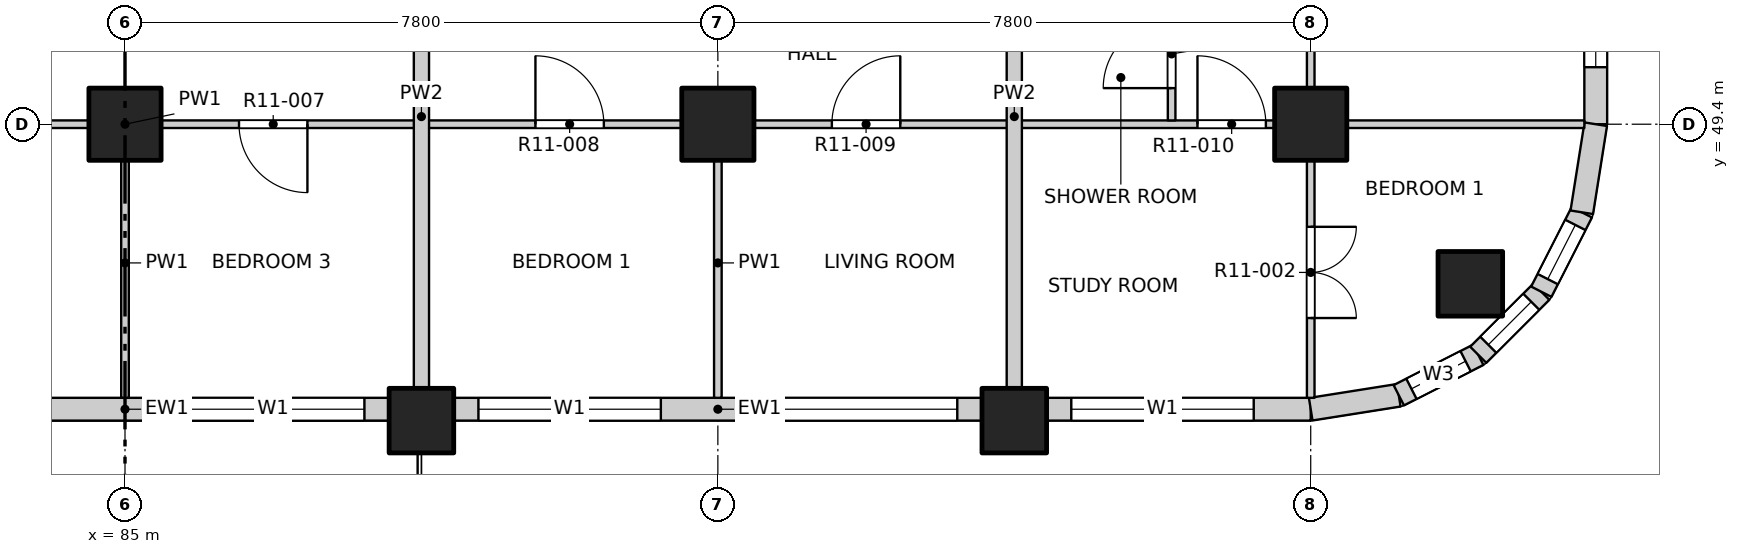
"""IFC4 building model, lengths in metres.
Left out: names, types, materials, properties, quantities, classifications, styles, units other than length and angle.
Written with IfcOpenShell. Run it as: python <this file> out.ifc"""

import sys

from ifc_helpers import new_model, si_unit, direction, frame, frame_2d, origin, origin_2d, place, context, subcontext, project, spatial, rectangle, extrude, element, fill, save


model = new_model("IFC4")
c1 = context("Model", 3, precision=1e-05, world=origin(), true_north=direction((0.0, 1.0)))
c2 = subcontext(c1, "Body", "Model", "MODEL_VIEW")
j1 = project(units=[si_unit("LENGTHUNIT", "METRE"), si_unit("PLANEANGLEUNIT", "RADIAN")], contexts=[c1])
p1 = place(None, origin())
s1 = spatial("IfcSite", under=j1, at=p1, CompositionType="ELEMENT")
p2 = place(p1, origin())
s2 = spatial("IfcBuilding", under=s1, at=p2, CompositionType="ELEMENT")
p3 = place(p2, frame((0.0, 0.0, 130.5)))
s3 = spatial("IfcBuildingStorey", under=s2, at=p3, CompositionType="ELEMENT", Elevation=130.5)
for number, where, z_axis, x_axis in (
    (1, (102.7, 47.3, -0.25), (0.0, 0.0, 1.0), (1.0, 0.0, 0.0)),
    (2, (88.9, 45.5, -0.25), (0.0, 0.0, 1.0), (1.0, 0.0, 0.0)),
    (3, (96.7, 45.5, -0.25), (0.0, 0.0, 1.0), (1.0, 0.0, 0.0)),
):
    element("IfcColumn", number, at=place(p3, frame(where, z_axis=z_axis, x_axis=x_axis)), inside=s3, PredefinedType="COLUMN", context=c2, shape_type="SweptSolid", body=[
        extrude(rectangle(XDim=0.85, YDim=0.85, at=origin_2d()), origin(), (0.0, 0.0, 1.0), 3.4),
    ])
for number, where, z_axis, x_axis in (
    (4, (85.0, 49.4, -0.25), (0.0, 0.0, 1.0), (1.0, 0.0, 0.0)),
    (5, (92.8, 49.4, -0.25), (0.0, 0.0, 1.0), (1.0, 0.0, 0.0)),
    (6, (100.6, 49.4, -0.25), (0.0, 0.0, 1.0), (1.0, 0.0, 0.0)),
):
    element("IfcColumn", number, at=place(p3, frame(where, z_axis=z_axis, x_axis=x_axis)), inside=s3, PredefinedType="COLUMN", context=c2, shape_type="SweptSolid", body=[
        extrude(rectangle(XDim=0.95, YDim=0.95, at=origin_2d()), origin(), (0.0, 0.0, 1.0), 3.4),
    ])
p4 = place(p3, frame((81.525, 45.65, 0.0), z_axis=(0.0, 0.0, 1.0), x_axis=(1.0, 0.0, 0.0)))
e7 = element("IfcWall", 7, at=p4, inside=s3, PredefinedType="SOLIDWALL", context=c2, shape_type="SweptSolid", body=[
    extrude(rectangle(XDim=6.95, YDim=0.3, at=frame_2d((3.475, 0.0))), origin(), (0.0, 0.0, 1.0), 2.7),
])
p5 = place(p4, frame((0.625, 0.0, 0.0)))
e8 = element("IfcOpeningElement", 8, at=p5, cuts=e7, PredefinedType="OPENING", context=c2, shape_type="SweptSolid", body=[
    extrude(rectangle(XDim=1.8, YDim=2.4, at=frame_2d((0.9, 1.2))), frame((0.0, 0.16, 0.0), z_axis=(0.0, -1.0, 0.0), x_axis=(1.0, 0.0, 0.0)), (0.0, 0.0, 1.0), 0.32),
])
p6 = place(p4, frame((4.225, 0.0, 0.9)))
e9 = element("IfcOpeningElement", 9, at=p6, cuts=e7, PredefinedType="OPENING", context=c2, shape_type="SweptSolid", body=[
    extrude(rectangle(XDim=2.4, YDim=1.8, at=frame_2d((1.2, 0.9))), frame((0.0, 0.16, 0.0), z_axis=(0.0, -1.0, 0.0), x_axis=(1.0, 0.0, 0.0)), (0.0, 0.0, 1.0), 0.32),
])
p7 = place(p3, frame((89.325, 45.65, 0.0), z_axis=(0.0, 0.0, 1.0), x_axis=(1.0, 0.0, 0.0)))
e10 = element("IfcWall", 10, at=p7, inside=s3, PredefinedType="SOLIDWALL", context=c2, shape_type="SweptSolid", body=[
    extrude(rectangle(XDim=6.95, YDim=0.3, at=frame_2d((3.475, 0.0))), origin(), (0.0, 0.0, 1.0), 2.7),
])
p8 = place(p7, frame((0.325, 0.0, 0.9)))
e11 = element("IfcOpeningElement", 11, at=p8, cuts=e10, PredefinedType="OPENING", context=c2, shape_type="SweptSolid", body=[
    extrude(rectangle(XDim=2.4, YDim=1.8, at=frame_2d((1.2, 0.9))), frame((0.0, 0.16, 0.0), z_axis=(0.0, -1.0, 0.0), x_axis=(1.0, 0.0, 0.0)), (0.0, 0.0, 1.0), 0.32),
])
p9 = place(p7, frame((4.225, 0.0, 0.9)))
e12 = element("IfcOpeningElement", 12, at=p9, cuts=e10, PredefinedType="OPENING", context=c2, shape_type="SweptSolid", body=[
    extrude(rectangle(XDim=2.4, YDim=1.8, at=frame_2d((1.2, 0.9))), frame((0.0, 0.16, 0.0), z_axis=(0.0, -1.0, 0.0), x_axis=(1.0, 0.0, 0.0)), (0.0, 0.0, 1.0), 0.32),
])
p10 = place(p3, frame((97.125, 45.65, 0.0), z_axis=(0.0, 0.0, 1.0), x_axis=(1.0, 0.0, 0.0)))
e13 = element("IfcWall", 13, at=p10, inside=s3, PredefinedType="SOLIDWALL", context=c2, shape_type="SweptSolid", body=[
    extrude(rectangle(XDim=3.475, YDim=0.3, at=frame_2d((1.738, 0.0))), origin(), (0.0, 0.0, 1.0), 2.7),
])
p11 = place(p10, frame((0.325, 0.0, 0.9)))
e14 = element("IfcOpeningElement", 14, at=p11, cuts=e13, PredefinedType="OPENING", context=c2, shape_type="SweptSolid", body=[
    extrude(rectangle(XDim=2.4, YDim=1.8, at=frame_2d((1.2, 0.9))), frame((0.0, 0.16, 0.0), z_axis=(0.0, -1.0, 0.0), x_axis=(1.0, 0.0, 0.0)), (0.0, 0.0, 1.0), 0.32),
])
p12 = place(p3, frame((104.35, 49.4, 0.0), z_axis=(0.0, 0.0, 1.0), x_axis=(0.0, 1.0, 0.0)))
e15 = element("IfcWall", 15, at=p12, inside=s3, PredefinedType="SOLIDWALL", context=c2, shape_type="SweptSolid", body=[
    extrude(rectangle(XDim=3.475, YDim=0.3, at=frame_2d((1.738, 0.0))), origin(), (0.0, 0.0, 1.0), 2.7),
])
p13 = place(p12, frame((0.75, 0.0, 0.9)))
e16 = element("IfcOpeningElement", 16, at=p13, cuts=e15, PredefinedType="OPENING", context=c2, shape_type="SweptSolid", body=[
    extrude(rectangle(XDim=2.4, YDim=1.8, at=frame_2d((1.2, 0.9))), frame((0.0, 0.16, 0.0), z_axis=(0.0, -1.0, 0.0), x_axis=(1.0, 0.0, 0.0)), (0.0, 0.0, 1.0), 0.32),
])
p14 = place(p3, frame((100.6, 45.65, 0.0), z_axis=(0.0, 0.0, 1.0), x_axis=(0.987678452879, 0.156496880861, 0.0)))
e17 = element("IfcWall", 17, at=p14, inside=s3, PredefinedType="SOLIDWALL", context=c2, shape_type="SweptSolid", body=[
    extrude(rectangle(XDim=1.173, YDim=0.3, at=frame_2d((0.586, 0.0))), origin(), (0.0, 0.0, 1.0), 2.7),
])
p15 = place(p3, frame((101.759, 45.833, 0.0), z_axis=(0.0, 0.0, 1.0), x_axis=(0.890988677504, 0.454025524128, 0.0)))
e18 = element("IfcWall", 18, at=p15, inside=s3, PredefinedType="SOLIDWALL", context=c2, shape_type="SweptSolid", body=[
    extrude(rectangle(XDim=1.173, YDim=0.3, at=frame_2d((0.587, 0.0))), origin(), (0.0, 0.0, 1.0), 2.7),
])
p16 = place(p15, frame((0.187, 0.0, 0.9)))
e19 = element("IfcOpeningElement", 19, at=p16, cuts=e18, PredefinedType="OPENING", context=c2, shape_type="SweptSolid", body=[
    extrude(rectangle(XDim=0.8, YDim=1.2, at=frame_2d((0.4, 0.6))), frame((0.0, 0.16, 0.0), z_axis=(0.0, -1.0, 0.0), x_axis=(1.0, 0.0, 0.0)), (0.0, 0.0, 1.0), 0.32),
])
p17 = place(p3, frame((102.804, 46.366, 0.0), z_axis=(0.0, 0.0, 1.0), x_axis=(0.707106781187, 0.707106781187, 0.0)))
e20 = element("IfcWall", 20, at=p17, inside=s3, PredefinedType="SOLIDWALL", context=c2, shape_type="SweptSolid", body=[
    extrude(rectangle(XDim=1.173, YDim=0.3, at=frame_2d((0.586, 0.0))), origin(), (0.0, 0.0, 1.0), 2.7),
])
p18 = place(p17, frame((0.187, 0.0, 0.9)))
e21 = element("IfcOpeningElement", 21, at=p18, cuts=e20, PredefinedType="OPENING", context=c2, shape_type="SweptSolid", body=[
    extrude(rectangle(XDim=0.8, YDim=1.2, at=frame_2d((0.4, 0.6))), frame((0.0, 0.16, 0.0), z_axis=(0.0, -1.0, 0.0), x_axis=(1.0, 0.0, 0.0)), (0.0, 0.0, 1.0), 0.32),
])
p19 = place(p3, frame((103.634, 47.196, 0.0), z_axis=(0.0, 0.0, 1.0), x_axis=(0.454025524128, 0.890988677504, 0.0)))
e22 = element("IfcWall", 22, at=p19, inside=s3, PredefinedType="SOLIDWALL", context=c2, shape_type="SweptSolid", body=[
    extrude(rectangle(XDim=1.173, YDim=0.3, at=frame_2d((0.587, 0.0))), origin(), (0.0, 0.0, 1.0), 2.7),
])
p20 = place(p19, frame((0.187, 0.0, 0.9)))
e23 = element("IfcOpeningElement", 23, at=p20, cuts=e22, PredefinedType="OPENING", context=c2, shape_type="SweptSolid", body=[
    extrude(rectangle(XDim=0.8, YDim=1.2, at=frame_2d((0.4, 0.6))), frame((0.0, 0.16, 0.0), z_axis=(0.0, -1.0, 0.0), x_axis=(1.0, 0.0, 0.0)), (0.0, 0.0, 1.0), 0.32),
])
p21 = place(p3, frame((104.167, 48.241, 0.0), z_axis=(0.0, 0.0, 1.0), x_axis=(0.156496880861, 0.987678452879, 0.0)))
e24 = element("IfcWall", 24, at=p21, inside=s3, PredefinedType="SOLIDWALL", context=c2, shape_type="SweptSolid", body=[
    extrude(rectangle(XDim=1.173, YDim=0.3, at=frame_2d((0.586, 0.0))), origin(), (0.0, 0.0, 1.0), 2.7),
])
p22 = place(p3, frame((65.8, 49.4, 0.0), z_axis=(0.0, 0.0, 1.0), x_axis=(1.0, 0.0, 0.0)))
e25 = element("IfcWall", 25, at=p22, inside=s3, PredefinedType="PARTITIONING", context=c2, shape_type="SweptSolid", body=[
    extrude(rectangle(XDim=38.4, YDim=0.1, at=frame_2d((19.2, 0.0))), origin(), (0.0, 0.0, 1.0), 3.15),
])
p23 = place(p22, frame((4.19, 0.0, 0.0)))
e26 = element("IfcOpeningElement", 26, at=p23, cuts=e25, PredefinedType="OPENING", context=c2, shape_type="SweptSolid", body=[
    extrude(rectangle(XDim=0.9, YDim=2.1, at=frame_2d((0.45, 1.05))), frame((0.0, 0.06, 0.0), z_axis=(0.0, -1.0, 0.0), x_axis=(1.0, 0.0, 0.0)), (0.0, 0.0, 1.0), 0.12),
])
p24 = place(p22, frame((9.0, 0.0, 0.0)))
e27 = element("IfcOpeningElement", 27, at=p24, cuts=e25, PredefinedType="OPENING", context=c2, shape_type="SweptSolid", body=[
    extrude(rectangle(XDim=0.9, YDim=2.1, at=frame_2d((0.45, 1.05))), frame((0.0, 0.06, 0.0), z_axis=(0.0, -1.0, 0.0), x_axis=(1.0, 0.0, 0.0)), (0.0, 0.0, 1.0), 0.12),
])
p25 = place(p22, frame((12.9, 0.0, 0.0)))
e28 = element("IfcOpeningElement", 28, at=p25, cuts=e25, PredefinedType="OPENING", context=c2, shape_type="SweptSolid", body=[
    extrude(rectangle(XDim=0.9, YDim=2.1, at=frame_2d((0.45, 1.05))), frame((0.0, 0.06, 0.0), z_axis=(0.0, -1.0, 0.0), x_axis=(1.0, 0.0, 0.0)), (0.0, 0.0, 1.0), 0.12),
])
p26 = place(p22, frame((16.8, 0.0, 0.0)))
e29 = element("IfcOpeningElement", 29, at=p26, cuts=e25, PredefinedType="OPENING", context=c2, shape_type="SweptSolid", body=[
    extrude(rectangle(XDim=0.9, YDim=2.1, at=frame_2d((0.45, 1.05))), frame((0.0, 0.06, 0.0), z_axis=(0.0, -1.0, 0.0), x_axis=(1.0, 0.0, 0.0)), (0.0, 0.0, 1.0), 0.12),
])
p27 = place(p22, frame((20.7, 0.0, 0.0)))
e30 = element("IfcOpeningElement", 30, at=p27, cuts=e25, PredefinedType="OPENING", context=c2, shape_type="SweptSolid", body=[
    extrude(rectangle(XDim=0.9, YDim=2.1, at=frame_2d((0.45, 1.05))), frame((0.0, 0.06, 0.0), z_axis=(0.0, -1.0, 0.0), x_axis=(1.0, 0.0, 0.0)), (0.0, 0.0, 1.0), 0.12),
])
p28 = place(p22, frame((24.6, 0.0, 0.0)))
e31 = element("IfcOpeningElement", 31, at=p28, cuts=e25, PredefinedType="OPENING", context=c2, shape_type="SweptSolid", body=[
    extrude(rectangle(XDim=0.9, YDim=2.1, at=frame_2d((0.45, 1.05))), frame((0.0, 0.06, 0.0), z_axis=(0.0, -1.0, 0.0), x_axis=(1.0, 0.0, 0.0)), (0.0, 0.0, 1.0), 0.12),
])
p29 = place(p22, frame((28.5, 0.0, 0.0)))
e32 = element("IfcOpeningElement", 32, at=p29, cuts=e25, PredefinedType="OPENING", context=c2, shape_type="SweptSolid", body=[
    extrude(rectangle(XDim=0.9, YDim=2.1, at=frame_2d((0.45, 1.05))), frame((0.0, 0.06, 0.0), z_axis=(0.0, -1.0, 0.0), x_axis=(1.0, 0.0, 0.0)), (0.0, 0.0, 1.0), 0.12),
])
p30 = place(p22, frame((33.31, 0.0, 0.0)))
e33 = element("IfcOpeningElement", 33, at=p30, cuts=e25, PredefinedType="OPENING", context=c2, shape_type="SweptSolid", body=[
    extrude(rectangle(XDim=0.9, YDim=2.1, at=frame_2d((0.45, 1.05))), frame((0.0, 0.06, 0.0), z_axis=(0.0, -1.0, 0.0), x_axis=(1.0, 0.0, 0.0)), (0.0, 0.0, 1.0), 0.12),
])
p31 = place(p3, frame((85.0, 45.8, 0.0), z_axis=(0.0, 0.0, 1.0), x_axis=(0.0, 1.0, 0.0)))
e34 = element("IfcWall", 34, at=p31, inside=s3, PredefinedType="PARTITIONING", context=c2, shape_type="SweptSolid", body=[
    extrude(rectangle(XDim=3.55, YDim=0.1, at=frame_2d((1.775, 0.0))), origin(), (0.0, 0.0, 1.0), 3.15),
])
p32 = place(p3, frame((88.9, 45.8, 0.0), z_axis=(0.0, 0.0, 1.0), x_axis=(0.0, 1.0, 0.0)))
e35 = element("IfcWall", 35, at=p32, inside=s3, PredefinedType="PARTITIONING", context=c2, shape_type="SweptSolid", body=[
    extrude(rectangle(XDim=7.4, YDim=0.2, at=frame_2d((3.7, 0.0))), origin(), (0.0, 0.0, 1.0), 2.55),
])
p33 = place(p3, frame((92.8, 45.8, 0.0), z_axis=(0.0, 0.0, 1.0), x_axis=(0.0, 1.0, 0.0)))
e36 = element("IfcWall", 36, at=p33, inside=s3, PredefinedType="PARTITIONING", context=c2, shape_type="SweptSolid", body=[
    extrude(rectangle(XDim=3.55, YDim=0.1, at=frame_2d((1.775, 0.0))), origin(), (0.0, 0.0, 1.0), 3.15),
])
p34 = place(p3, frame((96.7, 45.8, 0.0), z_axis=(0.0, 0.0, 1.0), x_axis=(0.0, 1.0, 0.0)))
e37 = element("IfcWall", 37, at=p34, inside=s3, PredefinedType="PARTITIONING", context=c2, shape_type="SweptSolid", body=[
    extrude(rectangle(XDim=7.4, YDim=0.2, at=frame_2d((3.7, 0.0))), origin(), (0.0, 0.0, 1.0), 3.15),
])
p35 = place(p3, frame((98.77, 49.45, 0.0), z_axis=(0.0, 0.0, 1.0), x_axis=(0.0, 1.0, 0.0)))
e38 = element("IfcWall", 38, at=p35, inside=s3, PredefinedType="PARTITIONING", context=c2, shape_type="SweptSolid", body=[
    extrude(rectangle(XDim=4.5, YDim=0.1, at=frame_2d((2.25, 0.0))), origin(), (0.0, 0.0, 1.0), 3.15),
])
p36 = place(p35, frame((0.425, 0.0, 0.0)))
e39 = element("IfcOpeningElement", 39, at=p36, cuts=e38, PredefinedType="OPENING", context=c2, shape_type="SweptSolid", body=[
    extrude(rectangle(XDim=0.9, YDim=2.1, at=frame_2d((0.45, 1.05))), frame((0.0, 0.06, 0.0), z_axis=(0.0, -1.0, 0.0), x_axis=(1.0, 0.0, 0.0)), (0.0, 0.0, 1.0), 0.12),
])
p37 = place(p35, frame((2.775, 0.0, 0.0)))
e40 = element("IfcOpeningElement", 40, at=p37, cuts=e38, PredefinedType="OPENING", context=c2, shape_type="SweptSolid", body=[
    extrude(rectangle(XDim=0.8, YDim=2.1, at=frame_2d((0.4, 1.05))), frame((0.0, 0.06, 0.0), z_axis=(0.0, -1.0, 0.0), x_axis=(1.0, 0.0, 0.0)), (0.0, 0.0, 1.0), 0.12),
])
p38 = place(p3, frame((100.6, 45.8, 0.0), z_axis=(0.0, 0.0, 1.0), x_axis=(0.0, 1.0, 0.0)))
e41 = element("IfcWall", 41, at=p38, inside=s3, PredefinedType="PARTITIONING", context=c2, shape_type="SweptSolid", body=[
    extrude(rectangle(XDim=38.4, YDim=0.1, at=frame_2d((19.2, 0.0))), origin(), (0.0, 0.0, 1.0), 3.15),
])
p39 = place(p38, frame((1.05, 0.0, 0.0)))
e42 = element("IfcOpeningElement", 42, at=p39, cuts=e41, PredefinedType="OPENING", context=c2, shape_type="SweptSolid", body=[
    extrude(rectangle(XDim=1.2, YDim=2.1, at=frame_2d((0.6, 1.05))), frame((0.0, 0.06, 0.0), z_axis=(0.0, -1.0, 0.0), x_axis=(1.0, 0.0, 0.0)), (0.0, 0.0, 1.0), 0.12),
])
p40 = place(p38, frame((5.1, 0.0, 0.0)))
e43 = element("IfcOpeningElement", 43, at=p40, cuts=e41, PredefinedType="OPENING", context=c2, shape_type="SweptSolid", body=[
    extrude(rectangle(XDim=0.9, YDim=2.1, at=frame_2d((0.45, 1.05))), frame((0.0, 0.06, 0.0), z_axis=(0.0, -1.0, 0.0), x_axis=(1.0, 0.0, 0.0)), (0.0, 0.0, 1.0), 0.12),
])
p41 = place(p38, frame((9.0, 0.0, 0.0)))
e44 = element("IfcOpeningElement", 44, at=p41, cuts=e41, PredefinedType="OPENING", context=c2, shape_type="SweptSolid", body=[
    extrude(rectangle(XDim=0.9, YDim=2.1, at=frame_2d((0.45, 1.05))), frame((0.0, 0.06, 0.0), z_axis=(0.0, -1.0, 0.0), x_axis=(1.0, 0.0, 0.0)), (0.0, 0.0, 1.0), 0.12),
])
p42 = place(p38, frame((12.9, 0.0, 0.0)))
e45 = element("IfcOpeningElement", 45, at=p42, cuts=e41, PredefinedType="OPENING", context=c2, shape_type="SweptSolid", body=[
    extrude(rectangle(XDim=0.9, YDim=2.1, at=frame_2d((0.45, 1.05))), frame((0.0, 0.06, 0.0), z_axis=(0.0, -1.0, 0.0), x_axis=(1.0, 0.0, 0.0)), (0.0, 0.0, 1.0), 0.12),
])
p43 = place(p38, frame((16.8, 0.0, 0.0)))
e46 = element("IfcOpeningElement", 46, at=p43, cuts=e41, PredefinedType="OPENING", context=c2, shape_type="SweptSolid", body=[
    extrude(rectangle(XDim=0.9, YDim=2.1, at=frame_2d((0.45, 1.05))), frame((0.0, 0.06, 0.0), z_axis=(0.0, -1.0, 0.0), x_axis=(1.0, 0.0, 0.0)), (0.0, 0.0, 1.0), 0.12),
])
p44 = place(p38, frame((20.7, 0.0, 0.0)))
e47 = element("IfcOpeningElement", 47, at=p44, cuts=e41, PredefinedType="OPENING", context=c2, shape_type="SweptSolid", body=[
    extrude(rectangle(XDim=0.9, YDim=2.1, at=frame_2d((0.45, 1.05))), frame((0.0, 0.06, 0.0), z_axis=(0.0, -1.0, 0.0), x_axis=(1.0, 0.0, 0.0)), (0.0, 0.0, 1.0), 0.12),
])
p45 = place(p38, frame((24.6, 0.0, 0.0)))
e48 = element("IfcOpeningElement", 48, at=p45, cuts=e41, PredefinedType="OPENING", context=c2, shape_type="SweptSolid", body=[
    extrude(rectangle(XDim=0.9, YDim=2.1, at=frame_2d((0.45, 1.05))), frame((0.0, 0.06, 0.0), z_axis=(0.0, -1.0, 0.0), x_axis=(1.0, 0.0, 0.0)), (0.0, 0.0, 1.0), 0.12),
])
p46 = place(p38, frame((30.3, 0.0, 0.0)))
e49 = element("IfcOpeningElement", 49, at=p46, cuts=e41, PredefinedType="OPENING", context=c2, shape_type="SweptSolid", body=[
    extrude(rectangle(XDim=1.2, YDim=2.1, at=frame_2d((0.6, 1.05))), frame((0.0, 0.06, 0.0), z_axis=(0.0, -1.0, 0.0), x_axis=(1.0, 0.0, 0.0)), (0.0, 0.0, 1.0), 0.12),
])
p47 = place(p38, frame((36.15, 0.0, 0.0)))
e50 = element("IfcOpeningElement", 50, at=p47, cuts=e41, PredefinedType="OPENING", context=c2, shape_type="SweptSolid", body=[
    extrude(rectangle(XDim=1.2, YDim=2.1, at=frame_2d((0.6, 1.05))), frame((0.0, 0.06, 0.0), z_axis=(0.0, -1.0, 0.0), x_axis=(1.0, 0.0, 0.0)), (0.0, 0.0, 1.0), 0.12),
])
p48 = place(p6, origin())
e51 = element("IfcWindow", 51, at=p48, inside=s3, PartitioningType="DOUBLE_PANEL_VERTICAL", PredefinedType="WINDOW", context=c2, shape_type="SweptSolid", body=[
    extrude(rectangle(XDim=2.4, YDim=1.8, at=frame_2d((1.2, 0.9))), frame((0.0, 0.03, 0.0), z_axis=(0.0, -1.0, 0.0), x_axis=(1.0, 0.0, 0.0)), (0.0, 0.0, 1.0), 0.06),
])
fill(e9, e51)
p49 = place(p8, origin())
e52 = element("IfcWindow", 52, at=p49, inside=s3, PartitioningType="DOUBLE_PANEL_VERTICAL", PredefinedType="WINDOW", context=c2, shape_type="SweptSolid", body=[
    extrude(rectangle(XDim=2.4, YDim=1.8, at=frame_2d((1.2, 0.9))), frame((0.0, 0.03, 0.0), z_axis=(0.0, -1.0, 0.0), x_axis=(1.0, 0.0, 0.0)), (0.0, 0.0, 1.0), 0.06),
])
fill(e11, e52)
p50 = place(p9, origin())
e53 = element("IfcWindow", 53, at=p50, inside=s3, PartitioningType="DOUBLE_PANEL_VERTICAL", PredefinedType="WINDOW", context=c2, shape_type="SweptSolid", body=[
    extrude(rectangle(XDim=2.4, YDim=1.8, at=frame_2d((1.2, 0.9))), frame((0.0, 0.03, 0.0), z_axis=(0.0, -1.0, 0.0), x_axis=(1.0, 0.0, 0.0)), (0.0, 0.0, 1.0), 0.06),
])
fill(e12, e53)
p51 = place(p11, origin())
e54 = element("IfcWindow", 54, at=p51, inside=s3, PartitioningType="DOUBLE_PANEL_VERTICAL", PredefinedType="WINDOW", context=c2, shape_type="SweptSolid", body=[
    extrude(rectangle(XDim=2.4, YDim=1.8, at=frame_2d((1.2, 0.9))), frame((0.0, 0.03, 0.0), z_axis=(0.0, -1.0, 0.0), x_axis=(1.0, 0.0, 0.0)), (0.0, 0.0, 1.0), 0.06),
])
fill(e14, e54)
p52 = place(p13, origin())
e55 = element("IfcWindow", 55, at=p52, inside=s3, PartitioningType="DOUBLE_PANEL_VERTICAL", PredefinedType="WINDOW", context=c2, shape_type="SweptSolid", body=[
    extrude(rectangle(XDim=2.4, YDim=1.8, at=frame_2d((1.2, 0.9))), frame((0.0, 0.03, 0.0), z_axis=(0.0, -1.0, 0.0), x_axis=(1.0, 0.0, 0.0)), (0.0, 0.0, 1.0), 0.06),
])
fill(e16, e55)
p53 = place(p16, origin())
e56 = element("IfcWindow", 56, at=p53, inside=s3, PartitioningType="SINGLE_PANEL", PredefinedType="WINDOW", context=c2, shape_type="SweptSolid", body=[
    extrude(rectangle(XDim=0.8, YDim=1.2, at=frame_2d((0.4, 0.6))), frame((0.0, 0.03, 0.0), z_axis=(0.0, -1.0, 0.0), x_axis=(1.0, 0.0, 0.0)), (0.0, 0.0, 1.0), 0.06),
])
fill(e19, e56)
p54 = place(p18, origin())
e57 = element("IfcWindow", 57, at=p54, inside=s3, PartitioningType="SINGLE_PANEL", PredefinedType="WINDOW", context=c2, shape_type="SweptSolid", body=[
    extrude(rectangle(XDim=0.8, YDim=1.2, at=frame_2d((0.4, 0.6))), frame((0.0, 0.03, 0.0), z_axis=(0.0, -1.0, 0.0), x_axis=(1.0, 0.0, 0.0)), (0.0, 0.0, 1.0), 0.06),
])
fill(e21, e57)
p55 = place(p20, origin())
e58 = element("IfcWindow", 58, at=p55, inside=s3, PartitioningType="SINGLE_PANEL", PredefinedType="WINDOW", context=c2, shape_type="SweptSolid", body=[
    extrude(rectangle(XDim=0.8, YDim=1.2, at=frame_2d((0.4, 0.6))), frame((0.0, 0.03, 0.0), z_axis=(0.0, -1.0, 0.0), x_axis=(1.0, 0.0, 0.0)), (0.0, 0.0, 1.0), 0.06),
])
fill(e23, e58)
p56 = place(p39, origin())
e59 = element("IfcDoor", 59, at=p56, inside=s3, OperationType="DOUBLE_DOOR_SINGLE_SWING", PredefinedType="DOOR", context=c2, shape_type="SweptSolid", body=[
    extrude(rectangle(XDim=1.2, YDim=2.1, at=frame_2d((0.6, 1.05))), frame((0.0, 0.025, 0.0), z_axis=(0.0, -1.0, 0.0), x_axis=(1.0, 0.0, 0.0)), (0.0, 0.0, 1.0), 0.05),
])
fill(e42, e59)
p57 = place(p27, origin())
e60 = element("IfcDoor", 60, at=p57, inside=s3, OperationType="SINGLE_SWING_LEFT", PredefinedType="DOOR", context=c2, shape_type="SweptSolid", body=[
    extrude(rectangle(XDim=0.9, YDim=2.1, at=frame_2d((0.45, 1.05))), frame((0.0, 0.025, 0.0), z_axis=(0.0, -1.0, 0.0), x_axis=(1.0, 0.0, 0.0)), (0.0, 0.0, 1.0), 0.05),
])
fill(e30, e60)
p58 = place(p28, origin())
e61 = element("IfcDoor", 61, at=p58, inside=s3, OperationType="SINGLE_SWING_LEFT", PredefinedType="DOOR", context=c2, shape_type="SweptSolid", body=[
    extrude(rectangle(XDim=0.9, YDim=2.1, at=frame_2d((0.45, 1.05))), frame((0.0, 0.025, 0.0), z_axis=(0.0, -1.0, 0.0), x_axis=(1.0, 0.0, 0.0)), (0.0, 0.0, 1.0), 0.05),
])
fill(e31, e61)
p59 = place(p29, origin())
e62 = element("IfcDoor", 62, at=p59, inside=s3, OperationType="SINGLE_SWING_RIGHT", PredefinedType="DOOR", context=c2, shape_type="SweptSolid", body=[
    extrude(rectangle(XDim=0.9, YDim=2.1, at=frame_2d((0.45, 1.05))), frame((0.0, 0.025, 0.0), z_axis=(0.0, -1.0, 0.0), x_axis=(1.0, 0.0, 0.0)), (0.0, 0.0, 1.0), 0.05),
])
fill(e32, e62)
p60 = place(p30, origin())
e63 = element("IfcDoor", 63, at=p60, inside=s3, OperationType="SINGLE_SWING_LEFT", PredefinedType="DOOR", context=c2, shape_type="SweptSolid", body=[
    extrude(rectangle(XDim=0.9, YDim=2.1, at=frame_2d((0.45, 1.05))), frame((0.0, 0.025, 0.0), z_axis=(0.0, -1.0, 0.0), x_axis=(1.0, 0.0, 0.0)), (0.0, 0.0, 1.0), 0.05),
])
fill(e33, e63)
p61 = place(p36, origin())
e64 = element("IfcDoor", 64, at=p61, inside=s3, OperationType="SINGLE_SWING_LEFT", PredefinedType="DOOR", context=c2, shape_type="SweptSolid", body=[
    extrude(rectangle(XDim=0.9, YDim=2.1, at=frame_2d((0.45, 1.05))), frame((0.0, 0.025, 0.0), z_axis=(0.0, -1.0, 0.0), x_axis=(1.0, 0.0, 0.0)), (0.0, 0.0, 1.0), 0.05),
])
fill(e39, e64)
save(model, sys.argv[1])
